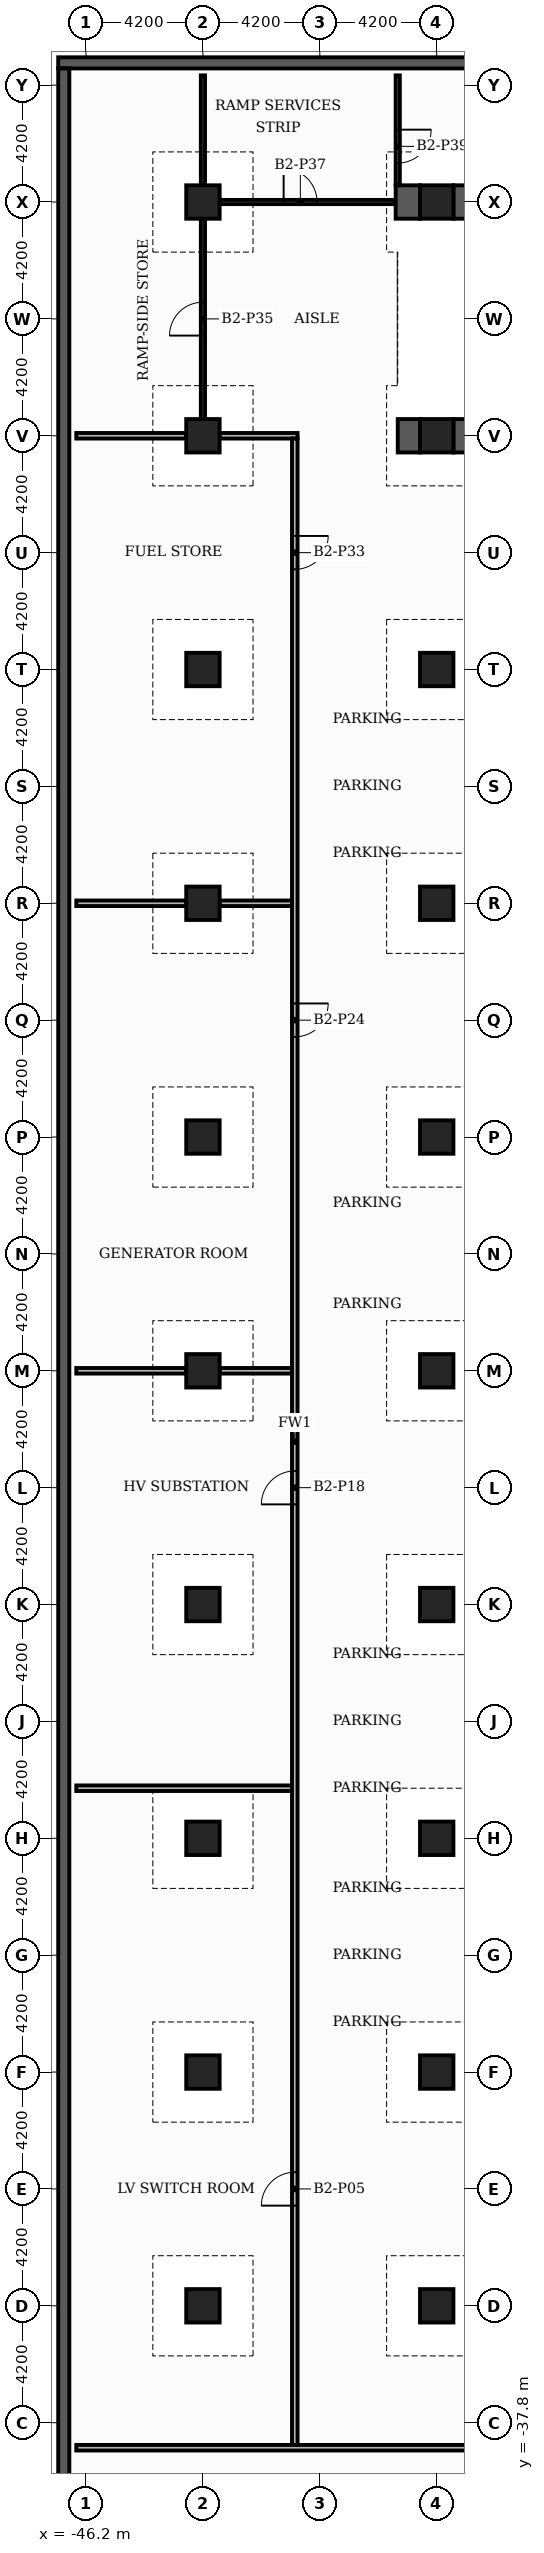
"""IFC4 building model, lengths in metres.
Left out: names, types, materials, properties, quantities, classifications, styles, units other than length and angle.
Written with IfcOpenShell. Run it as: python <this file> out.ifc"""

import sys

from ifc_helpers import new_model, si_unit, direction, frame, frame_2d, origin, origin_2d, place, context, subcontext, project, spatial, rectangle, extrude, element, fill, save


model = new_model("IFC4")
c1 = context("Model", 3, precision=1e-05, world=origin(), true_north=direction((0.0, 1.0)))
c2 = subcontext(c1, "Body", "Model", "MODEL_VIEW")
j1 = project(units=[si_unit("LENGTHUNIT", "METRE"), si_unit("PLANEANGLEUNIT", "RADIAN")], contexts=[c1])
p1 = place(None, origin())
s1 = spatial("IfcSite", under=j1, at=p1, CompositionType="ELEMENT")
p2 = place(p1, origin())
s2 = spatial("IfcBuilding", under=s1, at=p2, CompositionType="ELEMENT")
p3 = place(p2, frame((0.0, 0.0, -8.4)))
s3 = spatial("IfcBuildingStorey", under=s2, at=p3, CompositionType="ELEMENT", Elevation=-8.4)
p4 = place(p3, frame((-47.2, 47.0, -0.4), z_axis=(0.0, 0.0, 1.0), x_axis=(1.0, 0.0, 0.0)))
e1 = element("IfcWall", 1, at=p4, inside=s3, PredefinedType="USERDEFINED", context=c2, shape_type="SweptSolid", body=[
    extrude(rectangle(XDim=94.4, YDim=0.4, at=frame_2d((47.2, 0.0))), origin(), (0.0, 0.0, 1.0), 4.6),
])
p5 = place(p3, frame((-47.0, -46.8, -0.4), z_axis=(0.0, 0.0, 1.0), x_axis=(0.0, 1.0, 0.0)))
e2 = element("IfcWall", 2, at=p5, inside=s3, PredefinedType="USERDEFINED", context=c2, shape_type="SweptSolid", body=[
    extrude(rectangle(XDim=93.6, YDim=0.4, at=frame_2d((46.8, 0.0))), origin(), (0.0, 0.0, 1.0), 4.6),
])
for number, where, z_axis, x_axis in (
    (3, (-33.6, 0.0, 0.0), (0.0, 0.0, 1.0), (1.0, 0.0, 0.0)),
    (4, (-33.6, 8.4, 0.0), (0.0, 0.0, 1.0), (1.0, 0.0, 0.0)),
    (5, (-33.6, 16.8, 0.0), (0.0, 0.0, 1.0), (1.0, 0.0, 0.0)),
    (6, (-33.6, 25.2, 0.0), (0.0, 0.0, 1.0), (1.0, 0.0, 0.0)),
    (7, (-33.6, 33.6, 0.0), (0.0, 0.0, 1.0), (1.0, 0.0, 0.0)),
    (8, (-33.6, 42.0, 0.0), (0.0, 0.0, 1.0), (1.0, 0.0, 0.0)),
    (9, (-33.6, -8.4, 0.0), (0.0, 0.0, 1.0), (1.0, 0.0, 0.0)),
    (10, (-33.6, -16.8, 0.0), (0.0, 0.0, 1.0), (1.0, 0.0, 0.0)),
    (11, (-33.6, -25.2, 0.0), (0.0, 0.0, 1.0), (1.0, 0.0, 0.0)),
    (12, (-33.6, -33.6, 0.0), (0.0, 0.0, 1.0), (1.0, 0.0, 0.0)),
    (13, (-42.0, 0.0, 0.0), (0.0, 0.0, 1.0), (1.0, 0.0, 0.0)),
    (14, (-42.0, 8.4, 0.0), (0.0, 0.0, 1.0), (1.0, 0.0, 0.0)),
    (15, (-42.0, 16.8, 0.0), (0.0, 0.0, 1.0), (1.0, 0.0, 0.0)),
    (16, (-42.0, 25.2, 0.0), (0.0, 0.0, 1.0), (1.0, 0.0, 0.0)),
    (17, (-42.0, 33.6, 0.0), (0.0, 0.0, 1.0), (1.0, 0.0, 0.0)),
    (18, (-42.0, 42.0, 0.0), (0.0, 0.0, 1.0), (1.0, 0.0, 0.0)),
    (19, (-42.0, -8.4, 0.0), (0.0, 0.0, 1.0), (1.0, 0.0, 0.0)),
    (20, (-42.0, -16.8, 0.0), (0.0, 0.0, 1.0), (1.0, 0.0, 0.0)),
    (21, (-42.0, -25.2, 0.0), (0.0, 0.0, 1.0), (1.0, 0.0, 0.0)),
    (22, (-42.0, -33.6, 0.0), (0.0, 0.0, 1.0), (1.0, 0.0, 0.0)),
):
    element("IfcColumn", number, at=place(p3, frame(where, z_axis=z_axis, x_axis=x_axis)), inside=s3, PredefinedType="COLUMN", context=c2, shape_type="SweptSolid", body=[
        extrude(rectangle(XDim=1.2, YDim=1.2, at=origin_2d()), origin(), (0.0, 0.0, 1.0), 4.2),
    ])
p6 = place(p3, frame((-46.55, -38.7, 0.0), z_axis=(0.0, 0.0, 1.0), x_axis=(1.0, 0.0, 0.0)))
e23 = element("IfcWall", 23, at=p6, inside=s3, PredefinedType="PARTITIONING", context=c2, shape_type="SweptSolid", body=[
    extrude(rectangle(XDim=29.85, YDim=0.2, at=frame_2d((14.925, 0.0))), origin(), (0.0, 0.0, 1.0), 3.85),
])
p7 = place(p6, frame((16.55, 0.0, 0.0)))
e24 = element("IfcOpeningElement", 24, at=p7, cuts=e23, PredefinedType="OPENING", context=c2, shape_type="SweptSolid", body=[
    extrude(rectangle(XDim=1.2, YDim=2.2, at=frame_2d((0.6, 1.1))), frame((0.0, 0.11, 0.0), z_axis=(0.0, -1.0, 0.0), x_axis=(1.0, 0.0, 0.0)), (0.0, 0.0, 1.0), 0.22),
])
p8 = place(p3, frame((-46.55, -15.0, 0.0), z_axis=(0.0, 0.0, 1.0), x_axis=(1.0, 0.0, 0.0)))
e25 = element("IfcWall", 25, at=p8, inside=s3, PredefinedType="PARTITIONING", context=c2, shape_type="SweptSolid", body=[
    extrude(rectangle(XDim=7.75, YDim=0.2, at=frame_2d((3.875, 0.0))), origin(), (0.0, 0.0, 1.0), 3.85),
])
p9 = place(p3, frame((-46.55, 0.0, 0.0), z_axis=(0.0, 0.0, 1.0), x_axis=(1.0, 0.0, 0.0)))
e26 = element("IfcWall", 26, at=p9, inside=s3, PredefinedType="PARTITIONING", context=c2, shape_type="SweptSolid", body=[
    extrude(rectangle(XDim=3.95, YDim=0.2, at=frame_2d((1.975, 0.0))), origin(), (0.0, 0.0, 1.0), 3.85),
])
p10 = place(p3, frame((-41.4, 0.0, 0.0), z_axis=(0.0, 0.0, 1.0), x_axis=(1.0, 0.0, 0.0)))
e27 = element("IfcWall", 27, at=p10, inside=s3, PredefinedType="PARTITIONING", context=c2, shape_type="SweptSolid", body=[
    extrude(rectangle(XDim=2.6, YDim=0.2, at=frame_2d((1.3, 0.0))), origin(), (0.0, 0.0, 1.0), 3.85),
])
p11 = place(p3, frame((-46.55, 16.8, 0.0), z_axis=(0.0, 0.0, 1.0), x_axis=(1.0, 0.0, 0.0)))
e28 = element("IfcWall", 28, at=p11, inside=s3, PredefinedType="PARTITIONING", context=c2, shape_type="SweptSolid", body=[
    extrude(rectangle(XDim=3.95, YDim=0.2, at=frame_2d((1.975, 0.0))), origin(), (0.0, 0.0, 1.0), 3.85),
])
p12 = place(p3, frame((-41.4, 16.8, 0.0), z_axis=(0.0, 0.0, 1.0), x_axis=(1.0, 0.0, 0.0)))
e29 = element("IfcWall", 29, at=p12, inside=s3, PredefinedType="PARTITIONING", context=c2, shape_type="SweptSolid", body=[
    extrude(rectangle(XDim=2.6, YDim=0.2, at=frame_2d((1.3, 0.0))), origin(), (0.0, 0.0, 1.0), 3.85),
])
p13 = place(p3, frame((-46.55, 33.6, 0.0), z_axis=(0.0, 0.0, 1.0), x_axis=(1.0, 0.0, 0.0)))
e30 = element("IfcWall", 30, at=p13, inside=s3, PredefinedType="PARTITIONING", context=c2, shape_type="SweptSolid", body=[
    extrude(rectangle(XDim=3.95, YDim=0.2, at=frame_2d((1.975, 0.0))), origin(), (0.0, 0.0, 1.0), 3.85),
])
p14 = place(p3, frame((-41.4, 33.6, 0.0), z_axis=(0.0, 0.0, 1.0), x_axis=(1.0, 0.0, 0.0)))
e31 = element("IfcWall", 31, at=p14, inside=s3, PredefinedType="PARTITIONING", context=c2, shape_type="SweptSolid", body=[
    extrude(rectangle(XDim=2.8, YDim=0.2, at=frame_2d((1.4, 0.0))), origin(), (0.0, 0.0, 1.0), 3.85),
])
p15 = place(p3, frame((-35.0, 33.6, 0.0), z_axis=(0.0, 0.0, 1.0), x_axis=(1.0, 0.0, 0.0)))
e32 = element("IfcWall", 32, at=p15, inside=s3, PredefinedType="SOLIDWALL", context=c2, shape_type="SweptSolid", body=[
    extrude(rectangle(XDim=0.8, YDim=1.2, at=frame_2d((0.4, 0.0))), origin(), (0.0, 0.0, 1.0), 3.85),
])
p16 = place(p3, frame((-33.0, 33.6, 0.0), z_axis=(0.0, 0.0, 1.0), x_axis=(1.0, 0.0, 0.0)))
e33 = element("IfcWall", 33, at=p16, inside=s3, PredefinedType="SOLIDWALL", context=c2, shape_type="SweptSolid", body=[
    extrude(rectangle(XDim=7.2, YDim=1.2, at=frame_2d((3.6, 0.0))), origin(), (0.0, 0.0, 1.0), 3.85),
])
p17 = place(p3, frame((-41.4, 42.0, 0.0), z_axis=(0.0, 0.0, 1.0), x_axis=(1.0, 0.0, 0.0)))
e34 = element("IfcWall", 34, at=p17, inside=s3, PredefinedType="PARTITIONING", context=c2, shape_type="SweptSolid", body=[
    extrude(rectangle(XDim=6.325, YDim=0.15, at=frame_2d((3.163, 0.0))), origin(), (0.0, 0.0, 1.0), 3.85),
])
p18 = place(p17, frame((2.3, 0.0, 0.0)))
e35 = element("IfcOpeningElement", 35, at=p18, cuts=e34, PredefinedType="OPENING", context=c2, shape_type="SweptSolid", body=[
    extrude(rectangle(XDim=1.2, YDim=2.2, at=frame_2d((0.6, 1.1))), frame((0.0, 0.085, 0.0), z_axis=(0.0, -1.0, 0.0), x_axis=(1.0, 0.0, 0.0)), (0.0, 0.0, 1.0), 0.17),
])
p19 = place(p3, frame((-35.075, 42.0, 0.0), z_axis=(0.0, 0.0, 1.0), x_axis=(1.0, 0.0, 0.0)))
e36 = element("IfcWall", 36, at=p19, inside=s3, PredefinedType="SOLIDWALL", context=c2, shape_type="SweptSolid", body=[
    extrude(rectangle(XDim=0.875, YDim=1.2, at=frame_2d((0.438, 0.0))), origin(), (0.0, 0.0, 1.0), 3.85),
])
p20 = place(p3, frame((-33.0, 42.0, 0.0), z_axis=(0.0, 0.0, 1.0), x_axis=(1.0, 0.0, 0.0)))
e37 = element("IfcWall", 37, at=p20, inside=s3, PredefinedType="SOLIDWALL", context=c2, shape_type="SweptSolid", body=[
    extrude(rectangle(XDim=7.2, YDim=1.2, at=frame_2d((3.6, 0.0))), origin(), (0.0, 0.0, 1.0), 3.85),
])
p21 = place(p3, frame((-42.0, 34.2, 0.0), z_axis=(0.0, 0.0, 1.0), x_axis=(0.0, 1.0, 0.0)))
e38 = element("IfcWall", 38, at=p21, inside=s3, PredefinedType="PARTITIONING", context=c2, shape_type="SweptSolid", body=[
    extrude(rectangle(XDim=7.2, YDim=0.15, at=frame_2d((3.6, 0.0))), origin(), (0.0, 0.0, 1.0), 3.85),
])
p22 = place(p21, frame((3.0, 0.0, 0.0)))
e39 = element("IfcOpeningElement", 39, at=p22, cuts=e38, PredefinedType="OPENING", context=c2, shape_type="SweptSolid", body=[
    extrude(rectangle(XDim=1.2, YDim=2.2, at=frame_2d((0.6, 1.1))), frame((0.0, 0.085, 0.0), z_axis=(0.0, -1.0, 0.0), x_axis=(1.0, 0.0, 0.0)), (0.0, 0.0, 1.0), 0.17),
])
p23 = place(p3, frame((-42.0, 42.6, 0.0), z_axis=(0.0, 0.0, 1.0), x_axis=(0.0, 1.0, 0.0)))
e40 = element("IfcWall", 40, at=p23, inside=s3, PredefinedType="PARTITIONING", context=c2, shape_type="SweptSolid", body=[
    extrude(rectangle(XDim=3.95, YDim=0.15, at=frame_2d((1.975, 0.0))), origin(), (0.0, 0.0, 1.0), 3.85),
])
p24 = place(p3, frame((-38.7, -38.6, 0.0), z_axis=(0.0, 0.0, 1.0), x_axis=(0.0, 1.0, 0.0)))
e41 = element("IfcWall", 41, at=p24, inside=s3, PredefinedType="PARTITIONING", context=c2, shape_type="SweptSolid", body=[
    extrude(rectangle(XDim=72.1, YDim=0.2, at=frame_2d((36.05, 0.0))), origin(), (0.0, 0.0, 1.0), 3.85),
])
p25 = place(p24, frame((8.6, 0.0, 0.0)))
e42 = element("IfcOpeningElement", 42, at=p25, cuts=e41, PredefinedType="OPENING", context=c2, shape_type="SweptSolid", body=[
    extrude(rectangle(XDim=1.2, YDim=2.2, at=frame_2d((0.6, 1.1))), frame((0.0, 0.11, 0.0), z_axis=(0.0, -1.0, 0.0), x_axis=(1.0, 0.0, 0.0)), (0.0, 0.0, 1.0), 0.22),
])
p26 = place(p24, frame((33.8, 0.0, 0.0)))
e43 = element("IfcOpeningElement", 43, at=p26, cuts=e41, PredefinedType="OPENING", context=c2, shape_type="SweptSolid", body=[
    extrude(rectangle(XDim=1.2, YDim=2.2, at=frame_2d((0.6, 1.1))), frame((0.0, 0.11, 0.0), z_axis=(0.0, -1.0, 0.0), x_axis=(1.0, 0.0, 0.0)), (0.0, 0.0, 1.0), 0.22),
])
p27 = place(p24, frame((50.6, 0.0, 0.0)))
e44 = element("IfcOpeningElement", 44, at=p27, cuts=e41, PredefinedType="OPENING", context=c2, shape_type="SweptSolid", body=[
    extrude(rectangle(XDim=1.2, YDim=2.2, at=frame_2d((0.6, 1.1))), frame((0.0, 0.11, 0.0), z_axis=(0.0, -1.0, 0.0), x_axis=(1.0, 0.0, 0.0)), (0.0, 0.0, 1.0), 0.22),
])
p28 = place(p24, frame((67.4, 0.0, 0.0)))
e45 = element("IfcOpeningElement", 45, at=p28, cuts=e41, PredefinedType="OPENING", context=c2, shape_type="SweptSolid", body=[
    extrude(rectangle(XDim=1.2, YDim=2.2, at=frame_2d((0.6, 1.1))), frame((0.0, 0.11, 0.0), z_axis=(0.0, -1.0, 0.0), x_axis=(1.0, 0.0, 0.0)), (0.0, 0.0, 1.0), 0.22),
])
p29 = place(p3, frame((-35.0, 42.6, 0.0), z_axis=(0.0, 0.0, 1.0), x_axis=(0.0, 1.0, 0.0)))
e46 = element("IfcWall", 46, at=p29, inside=s3, PredefinedType="PARTITIONING", context=c2, shape_type="SweptSolid", body=[
    extrude(rectangle(XDim=3.95, YDim=0.15, at=frame_2d((1.975, 0.0))), origin(), (0.0, 0.0, 1.0), 3.85),
])
p30 = place(p29, frame((0.8, 0.0, 0.0)))
e47 = element("IfcOpeningElement", 47, at=p30, cuts=e46, PredefinedType="OPENING", context=c2, shape_type="SweptSolid", body=[
    extrude(rectangle(XDim=1.2, YDim=2.2, at=frame_2d((0.6, 1.1))), frame((0.0, 0.085, 0.0), z_axis=(0.0, -1.0, 0.0), x_axis=(1.0, 0.0, 0.0)), (0.0, 0.0, 1.0), 0.17),
])
p31 = place(p25, origin())
e48 = element("IfcDoor", 48, at=p31, inside=s3, OperationType="SINGLE_SWING_LEFT", PredefinedType="DOOR", context=c2, shape_type="SweptSolid", body=[
    extrude(rectangle(XDim=1.2, YDim=2.2, at=frame_2d((0.6, 1.1))), frame((0.0, 0.025, 0.0), z_axis=(0.0, -1.0, 0.0), x_axis=(1.0, 0.0, 0.0)), (0.0, 0.0, 1.0), 0.05),
])
fill(e42, e48)
p32 = place(p26, origin())
e49 = element("IfcDoor", 49, at=p32, inside=s3, OperationType="SINGLE_SWING_LEFT", PredefinedType="DOOR", context=c2, shape_type="SweptSolid", body=[
    extrude(rectangle(XDim=1.2, YDim=2.2, at=frame_2d((0.6, 1.1))), frame((0.0, 0.025, 0.0), z_axis=(0.0, -1.0, 0.0), x_axis=(1.0, 0.0, 0.0)), (0.0, 0.0, 1.0), 0.05),
])
fill(e43, e49)
p33 = place(p27, origin())
e50 = element("IfcDoor", 50, at=p33, inside=s3, OperationType="SINGLE_SWING_RIGHT", PredefinedType="DOOR", context=c2, shape_type="SweptSolid", body=[
    extrude(rectangle(XDim=1.2, YDim=2.2, at=frame_2d((0.6, 1.1))), frame((0.0, 0.025, 0.0), z_axis=(0.0, -1.0, 0.0), x_axis=(1.0, 0.0, 0.0)), (0.0, 0.0, 1.0), 0.05),
])
fill(e44, e50)
p34 = place(p28, origin())
e51 = element("IfcDoor", 51, at=p34, inside=s3, OperationType="SINGLE_SWING_RIGHT", PredefinedType="DOOR", context=c2, shape_type="SweptSolid", body=[
    extrude(rectangle(XDim=1.2, YDim=2.2, at=frame_2d((0.6, 1.1))), frame((0.0, 0.025, 0.0), z_axis=(0.0, -1.0, 0.0), x_axis=(1.0, 0.0, 0.0)), (0.0, 0.0, 1.0), 0.05),
])
fill(e45, e51)
p35 = place(p22, origin())
e52 = element("IfcDoor", 52, at=p35, inside=s3, OperationType="SINGLE_SWING_LEFT", PredefinedType="DOOR", context=c2, shape_type="SweptSolid", body=[
    extrude(rectangle(XDim=1.2, YDim=2.2, at=frame_2d((0.6, 1.1))), frame((0.0, 0.025, 0.0), z_axis=(0.0, -1.0, 0.0), x_axis=(1.0, 0.0, 0.0)), (0.0, 0.0, 1.0), 0.05),
])
fill(e39, e52)
p36 = place(p18, origin())
e53 = element("IfcDoor", 53, at=p36, inside=s3, OperationType="SINGLE_SWING_LEFT", PredefinedType="DOOR", context=c2, shape_type="SweptSolid", body=[
    extrude(rectangle(XDim=1.2, YDim=2.2, at=frame_2d((0.6, 1.1))), frame((0.0, 0.025, 0.0), z_axis=(0.0, -1.0, 0.0), x_axis=(1.0, 0.0, 0.0)), (0.0, 0.0, 1.0), 0.05),
])
fill(e35, e53)
p37 = place(p30, origin())
e54 = element("IfcDoor", 54, at=p37, inside=s3, OperationType="SINGLE_SWING_RIGHT", PredefinedType="DOOR", context=c2, shape_type="SweptSolid", body=[
    extrude(rectangle(XDim=1.2, YDim=2.2, at=frame_2d((0.6, 1.1))), frame((0.0, 0.025, 0.0), z_axis=(0.0, -1.0, 0.0), x_axis=(1.0, 0.0, 0.0)), (0.0, 0.0, 1.0), 0.05),
])
fill(e47, e54)
save(model, sys.argv[1])
